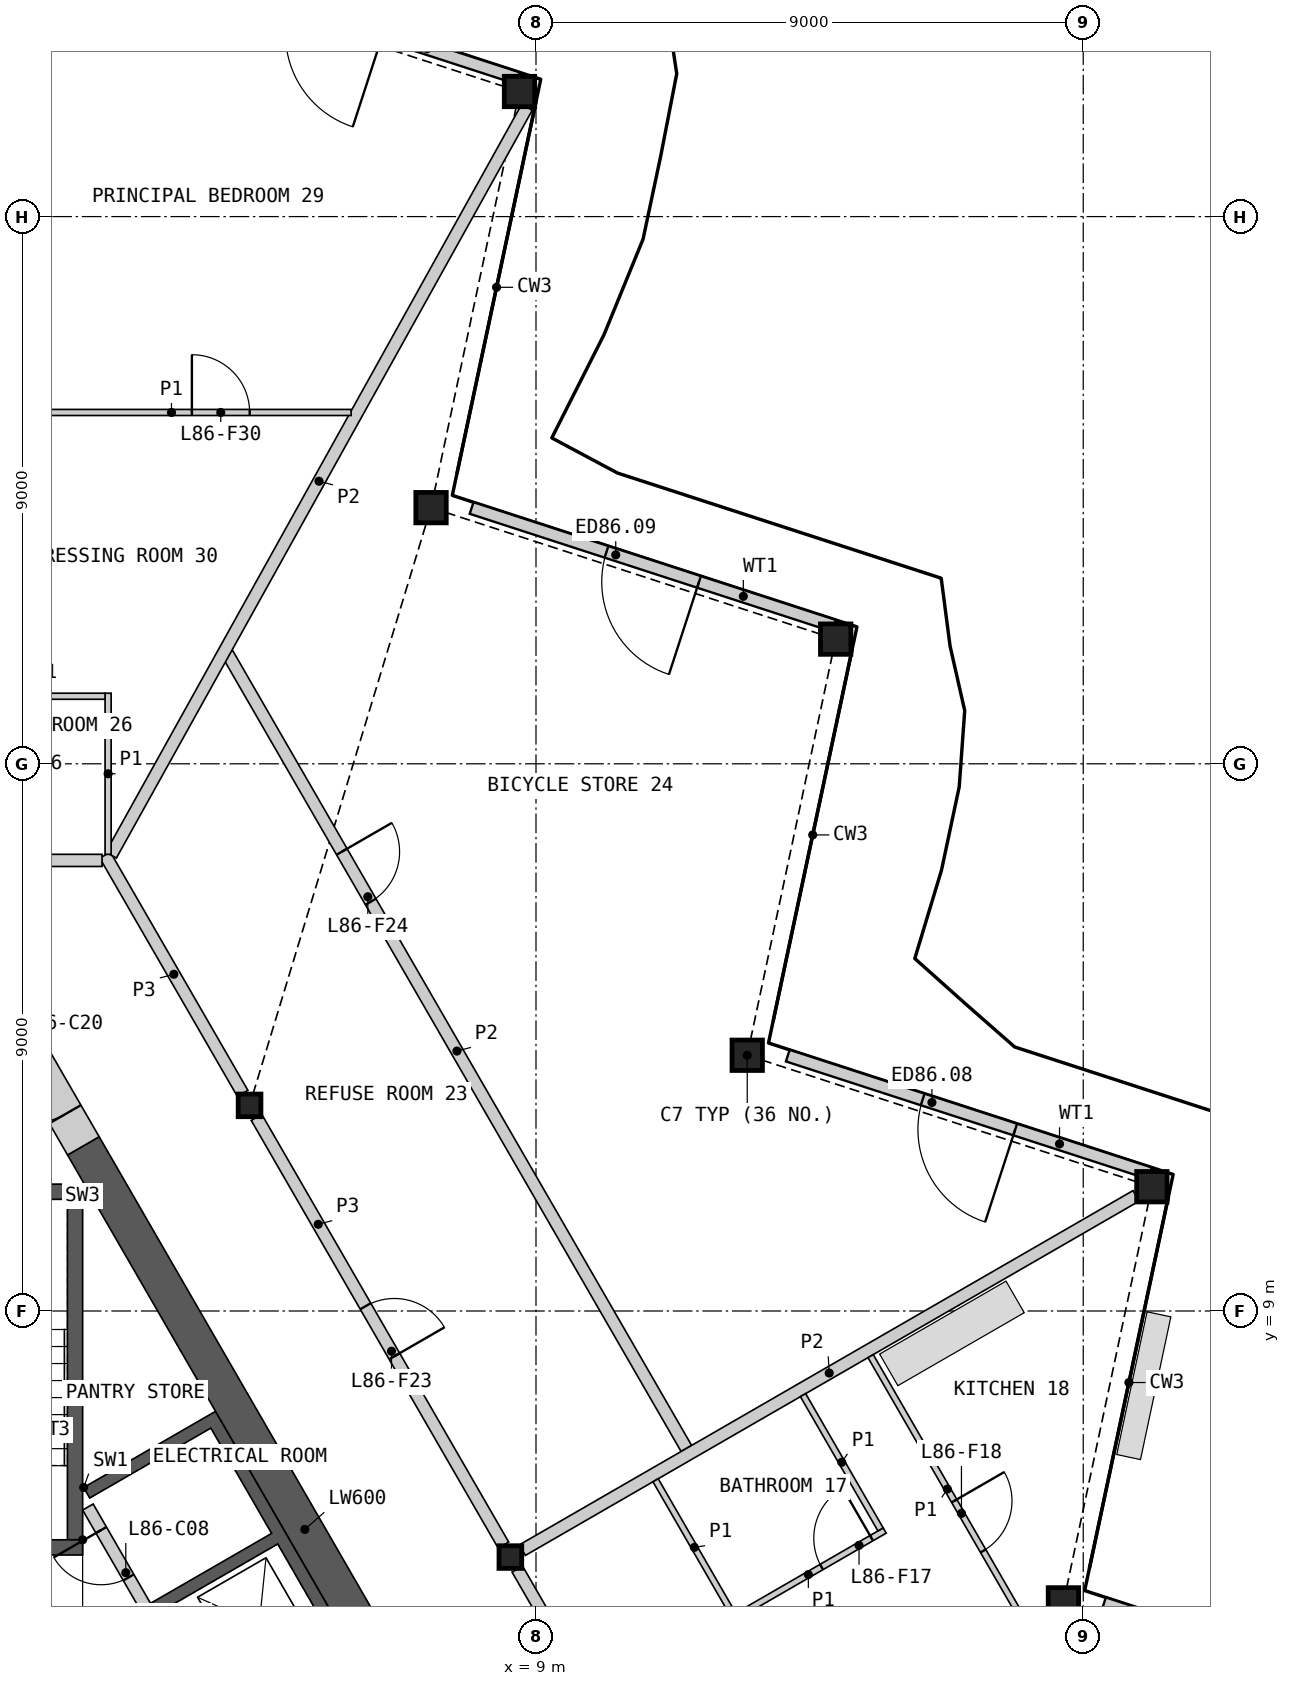
"""IFC4 building model, lengths in metres.
Left out: names, types, materials, properties, quantities, classifications, styles, units other than length and angle.
Written with IfcOpenShell. Run it as: python <this file> out.ifc"""

import sys

from ifc_helpers import new_model, si_unit, direction, frame, frame_2d, origin, origin_2d, place, context, subcontext, project, spatial, polyline, rectangle, hollow_rectangle, i_section, outline, extrude, element, fill, save


model = new_model("IFC4")
c1 = context("Model", 3, precision=1e-05, world=origin(), true_north=direction((0.0, 1.0)))
c2 = subcontext(c1, "Body", "Model", "MODEL_VIEW")
j1 = project(units=[si_unit("LENGTHUNIT", "METRE"), si_unit("PLANEANGLEUNIT", "RADIAN")], contexts=[c1])
p1 = place(None, origin())
s1 = spatial("IfcSite", under=j1, at=p1, CompositionType="ELEMENT")
p2 = place(p1, origin())
s2 = spatial("IfcBuilding", under=s1, at=p2, CompositionType="ELEMENT")
p3 = place(p2, frame((0.0, 0.0, 381.4)))
s3 = spatial("IfcBuildingStorey", under=s2, at=p3, CompositionType="ELEMENT", Elevation=381.4)
for number, where, z_axis, x_axis in (
    (1, (17.674, 4.199, 0.0), (0.0, 0.0, 1.0), (1.0, 0.0, 0.0)),
    (2, (19.129, 11.044, 0.0), (0.0, 0.0, 1.0), (1.0, 0.0, 0.0)),
    (3, (12.474, 13.206, 0.0), (0.0, 0.0, 1.0), (1.0, 0.0, 0.0)),
    (4, (13.929, 20.051, 0.0), (0.0, 0.0, 1.0), (1.0, 0.0, 0.0)),
    (5, (7.274, 22.213, 0.0), (0.0, 0.0, 1.0), (1.0, 0.0, 0.0)),
    (6, (8.729, 29.057, 0.0), (0.0, 0.0, 1.0), (1.0, 0.0, 0.0)),
):
    element("IfcColumn", number, at=place(p3, frame(where, z_axis=z_axis, x_axis=x_axis)), inside=s3, PredefinedType="COLUMN", context=c2, shape_type="SweptSolid", body=[
        extrude(hollow_rectangle(XDim=0.5, YDim=0.5, WallThickness=0.03, at=origin_2d()), origin(), (0.0, 0.0, 1.0), 3.4),
    ])
for number, where, z_axis, x_axis in (
    (7, (8.578, 4.953, 0.0), (0.0, 0.0, 1.0), (1.0, 0.0, 0.0)),
    (8, (4.289, 12.382, 0.0), (0.0, 0.0, 1.0), (1.0, 0.0, 0.0)),
):
    element("IfcColumn", number, at=place(p3, frame(where, z_axis=z_axis, x_axis=x_axis)), inside=s3, PredefinedType="COLUMN", context=c2, shape_type="SweptSolid", body=[
        extrude(i_section(OverallWidth=0.374, OverallDepth=0.372, WebThickness=0.016, FlangeThickness=0.026, at=origin_2d()), origin(), (0.0, 0.0, 1.0), 3.4),
    ])
p4 = place(p3, frame((24.3, 2.257, 0.0), z_axis=(0.0, 0.0, 1.0), x_axis=(-0.951060123915, 0.309005891041, 0.0)))
e9 = element("IfcWall", 9, at=p4, inside=s3, PredefinedType="SOLIDWALL", context=c2, shape_type="SweptSolid", body=[
    extrude(rectangle(XDim=6.265, YDim=0.2, at=frame_2d((3.133, 0.0))), origin(), (0.0, 0.0, 1.0), 2.634),
])
p5 = place(p4, frame((2.333, 0.0, 0.0)))
e10 = element("IfcOpeningElement", 10, at=p5, cuts=e9, PredefinedType="OPENING", context=c2, shape_type="SweptSolid", body=[
    extrude(rectangle(XDim=1.6, YDim=2.25, at=frame_2d((0.8, 1.125))), frame((0.0, 0.11, 0.0), z_axis=(0.0, -1.0, 0.0), x_axis=(1.0, 0.0, 0.0)), (0.0, 0.0, 1.0), 0.22),
])
p6 = place(p3, frame((19.099, 11.264, 0.0), z_axis=(0.0, 0.0, 1.0), x_axis=(-0.951056402988, 0.3090173431, 0.0)))
e11 = element("IfcWall", 11, at=p6, inside=s3, PredefinedType="SOLIDWALL", context=c2, shape_type="SweptSolid", body=[
    extrude(rectangle(XDim=6.265, YDim=0.2, at=frame_2d((3.133, 0.0))), origin(), (0.0, 0.0, 1.0), 2.634),
])
p7 = place(p6, frame((2.333, 0.0, 0.0)))
e12 = element("IfcOpeningElement", 12, at=p7, cuts=e11, PredefinedType="OPENING", context=c2, shape_type="SweptSolid", body=[
    extrude(rectangle(XDim=1.6, YDim=2.25, at=frame_2d((0.8, 1.125))), frame((0.0, 0.11, 0.0), z_axis=(0.0, -1.0, 0.0), x_axis=(1.0, 0.0, 0.0)), (0.0, 0.0, 1.0), 0.22),
])
p8 = place(p3, frame((13.899, 20.271, 0.0), z_axis=(0.0, 0.0, 1.0), x_axis=(-0.951056402988, 0.3090173431, 0.0)))
e13 = element("IfcWall", 13, at=p8, inside=s3, PredefinedType="SOLIDWALL", context=c2, shape_type="SweptSolid", body=[
    extrude(rectangle(XDim=6.265, YDim=0.2, at=frame_2d((3.133, 0.0))), origin(), (0.0, 0.0, 1.0), 2.634),
])
p9 = place(p8, frame((2.333, 0.0, 0.0)))
e14 = element("IfcOpeningElement", 14, at=p9, cuts=e13, PredefinedType="OPENING", context=c2, shape_type="SweptSolid", body=[
    extrude(rectangle(XDim=1.6, YDim=2.25, at=frame_2d((0.8, 1.125))), frame((0.0, 0.11, 0.0), z_axis=(0.0, -1.0, 0.0), x_axis=(1.0, 0.0, 0.0)), (0.0, 0.0, 1.0), 0.22),
])
p10 = place(p3, frame((8.699, 29.277, 0.0), z_axis=(0.0, 0.0, 1.0), x_axis=(-0.951048671744, 0.309041136379, 0.0)))
e15 = element("IfcWall", 15, at=p10, inside=s3, PredefinedType="SOLIDWALL", context=c2, shape_type="SweptSolid", body=[
    extrude(rectangle(XDim=6.265, YDim=0.2, at=frame_2d((3.133, 0.0))), origin(), (0.0, 0.0, 1.0), 2.634),
])
p11 = place(p10, frame((2.333, 0.0, 0.0)))
e16 = element("IfcOpeningElement", 16, at=p11, cuts=e15, PredefinedType="OPENING", context=c2, shape_type="SweptSolid", body=[
    extrude(rectangle(XDim=1.6, YDim=2.25, at=frame_2d((0.8, 1.125))), frame((0.0, 0.11, 0.0), z_axis=(0.0, -1.0, 0.0), x_axis=(1.0, 0.0, 0.0)), (0.0, 0.0, 1.0), 0.22),
])
p12 = place(p3, origin())
e17 = element("IfcWall", 17, at=p12, inside=s3, PredefinedType="SHEAR", context=c2, shape_type="SweptSolid", body=[
    extrude(outline(polyline([(1.561, 6.097), (3.731, 7.35), (8.231, -0.444), (6.061, -1.697), (5.96, -1.524), (7.952, -0.374), (6.952, 1.358), (4.96, 0.208), (4.861, 0.381), (6.852, 1.531), (5.852, 3.263), (3.861, 2.113), (3.76, 2.287), (5.752, 3.437), (4.752, 5.169), (2.76, 4.019), (2.66, 4.192), (4.652, 5.342), (3.652, 7.074), (1.66, 5.924), (1.561, 6.097)])), origin(), (0.0, 0.0, 1.0), 3.1),
])
p13 = place(p3, frame((5.817, -1.476, 0.0), z_axis=(0.0, 0.0, 1.0), x_axis=(-0.500002616675, 0.866023893041, 0.0)))
e18 = element("IfcWall", 18, at=p13, inside=s3, PredefinedType="SOLIDWALL", context=c2, shape_type="SweptSolid", body=[
    extrude(rectangle(XDim=8.373, YDim=0.2, at=frame_2d((4.187, 0.0))), origin(), (0.0, 0.0, 1.0), 3.1),
])
p14 = place(p13, frame((0.337, 0.0, 0.0)))
e19 = element("IfcOpeningElement", 19, at=p14, cuts=e18, PredefinedType="OPENING", context=c2, shape_type="SweptSolid", body=[
    extrude(rectangle(XDim=1.1, YDim=2.1, at=frame_2d((0.55, 1.05))), frame((0.0, 0.11, 0.0), z_axis=(0.0, -1.0, 0.0), x_axis=(1.0, 0.0, 0.0)), (0.0, 0.0, 1.0), 0.22),
])
p15 = place(p13, frame((2.537, 0.0, 0.0)))
e20 = element("IfcOpeningElement", 20, at=p15, cuts=e18, PredefinedType="OPENING", context=c2, shape_type="SweptSolid", body=[
    extrude(rectangle(XDim=1.1, YDim=2.1, at=frame_2d((0.55, 1.05))), frame((0.0, 0.11, 0.0), z_axis=(0.0, -1.0, 0.0), x_axis=(1.0, 0.0, 0.0)), (0.0, 0.0, 1.0), 0.22),
])
p16 = place(p13, frame((4.737, 0.0, 0.0)))
e21 = element("IfcOpeningElement", 21, at=p16, cuts=e18, PredefinedType="OPENING", context=c2, shape_type="SweptSolid", body=[
    extrude(rectangle(XDim=1.1, YDim=2.1, at=frame_2d((0.55, 1.05))), frame((0.0, 0.11, 0.0), z_axis=(0.0, -1.0, 0.0), x_axis=(1.0, 0.0, 0.0)), (0.0, 0.0, 1.0), 0.22),
])
p17 = place(p13, frame((7.037, 0.0, 0.0)))
e22 = element("IfcOpeningElement", 22, at=p17, cuts=e18, PredefinedType="OPENING", context=c2, shape_type="SweptSolid", body=[
    extrude(rectangle(XDim=0.9, YDim=2.1, at=frame_2d((0.45, 1.05))), frame((0.0, 0.11, 0.0), z_axis=(0.0, -1.0, 0.0), x_axis=(1.0, 0.0, 0.0)), (0.0, 0.0, 1.0), 0.22),
])
p18 = place(p3, origin())
e23 = element("IfcWall", 23, at=p18, inside=s3, PredefinedType="SHEAR", context=c2, shape_type="SweptSolid", body=[
    extrude(outline(polyline([(1.544, 5.237), (1.544, 11.087), (1.294, 10.837), (1.294, 5.237), (1.544, 5.237)])), origin(), (0.0, 0.0, 1.0), 3.1),
])
p19 = place(p3, origin())
e24 = element("IfcWall", 24, at=p19, inside=s3, PredefinedType="SHEAR", context=c2, shape_type="SweptSolid", body=[
    extrude(outline(polyline([(1.544, 11.087), (-1.544, 11.087), (-1.294, 10.837), (1.294, 10.837), (1.544, 11.087)])), origin(), (0.0, 0.0, 1.0), 3.1),
])
p20 = place(p3, frame((1.544, 5.112, 0.0), z_axis=(0.0, 0.0, 1.0), x_axis=(-1.0, 0.0, 0.0)))
e25 = element("IfcWall", 25, at=p20, inside=s3, PredefinedType="SHEAR", context=c2, shape_type="SweptSolid", body=[
    extrude(rectangle(XDim=3.088, YDim=0.25, at=frame_2d((1.544, 0.0))), origin(), (0.0, 0.0, 1.0), 3.1),
])
p21 = place(p20, frame((0.994, 0.0, 0.0)))
e26 = element("IfcOpeningElement", 26, at=p21, cuts=e25, PredefinedType="OPENING", context=c2, shape_type="SweptSolid", body=[
    extrude(rectangle(XDim=1.1, YDim=2.1, at=frame_2d((0.55, 1.05))), frame((0.0, 0.135, 0.0), z_axis=(0.0, -1.0, 0.0), x_axis=(1.0, 0.0, 0.0)), (0.0, 0.0, 1.0), 0.27),
])
p22 = place(p3, frame((8.841, -0.902, 0.0), z_axis=(0.0, 0.0, 1.0), x_axis=(-0.499995618375, 0.866027933502, 0.0)))
e27 = element("IfcWall", 27, at=p22, inside=s3, PredefinedType="SHEAR", context=c2, shape_type="SweptSolid", body=[
    extrude(rectangle(XDim=14.571, YDim=0.6, at=frame_2d((7.285, 0.0))), origin(), (0.0, 0.0, 1.0), 3.1),
])
p23 = place(p3, frame((1.556, 11.716, 0.0), z_axis=(0.0, 0.0, 1.0), x_axis=(-0.500018667571, 0.866014625789, 0.0)))
e28 = element("IfcWall", 28, at=p23, inside=s3, PredefinedType="SHEAR", context=c2, shape_type="SweptSolid", body=[
    extrude(rectangle(XDim=2.592, YDim=0.6, at=frame_2d((1.296, 0.0))), origin(), (0.0, 0.0, 1.0), 3.1),
])
p24 = place(p23, frame((0.6, 0.0, 0.0)))
e29 = element("IfcOpeningElement", 29, at=p24, cuts=e28, PredefinedType="OPENING", context=c2, shape_type="SweptSolid", body=[
    extrude(rectangle(XDim=1.0, YDim=2.1, at=frame_2d((0.5, 1.05))), frame((0.0, 0.31, 0.0), z_axis=(0.0, -1.0, 0.0), x_axis=(1.0, 0.0, 0.0)), (0.0, 0.0, 1.0), 0.62),
])
p25 = place(p3, frame((4.403, 12.185, 0.0), z_axis=(0.0, 0.0, 1.0), x_axis=(0.499992155518, -0.866029932751, 0.0)))
e30 = element("IfcWall", 30, at=p25, inside=s3, PredefinedType="PARTITIONING", context=c2, shape_type="SweptSolid", body=[
    extrude(rectangle(XDim=8.123, YDim=0.2, at=frame_2d((4.062, 0.0))), origin(), (0.0, 0.0, 1.0), 3.1),
])
p26 = place(p25, frame((3.587, 0.0, 0.0)))
e31 = element("IfcOpeningElement", 31, at=p26, cuts=e30, PredefinedType="OPENING", context=c2, shape_type="SweptSolid", body=[
    extrude(rectangle(XDim=0.95, YDim=2.1, at=frame_2d((0.475, 1.05))), frame((0.0, 0.11, 0.0), z_axis=(0.0, -1.0, 0.0), x_axis=(1.0, 0.0, 0.0)), (0.0, 0.0, 1.0), 0.22),
])
p27 = place(p3, frame((8.692, 4.756, 0.0), z_axis=(0.0, 0.0, 1.0), x_axis=(0.500001682468, -0.866024432409, 0.0)))
e32 = element("IfcWall", 32, at=p27, inside=s3, PredefinedType="PARTITIONING", context=c2, shape_type="SweptSolid", body=[
    extrude(rectangle(XDim=8.124, YDim=0.2, at=frame_2d((4.062, 0.0))), origin(), (0.0, 0.0, 1.0), 3.1),
])
p28 = place(p27, frame((1.956, 0.0, 0.0)))
e33 = element("IfcOpeningElement", 33, at=p28, cuts=e32, PredefinedType="OPENING", context=c2, shape_type="SweptSolid", body=[
    extrude(rectangle(XDim=1.0, YDim=2.1, at=frame_2d((0.5, 1.05))), frame((0.0, 0.11, 0.0), z_axis=(0.0, -1.0, 0.0), x_axis=(1.0, 0.0, 0.0)), (0.0, 0.0, 1.0), 0.22),
])
p29 = place(p3, frame((1.913, 16.498, 0.0), z_axis=(0.0, 0.0, 1.0), x_axis=(0.499974648164, -0.866040040179, 0.0)))
e34 = element("IfcWall", 34, at=p29, inside=s3, PredefinedType="PARTITIONING", context=c2, shape_type="SweptSolid", body=[
    extrude(rectangle(XDim=4.525, YDim=0.2, at=frame_2d((2.263, 0.0))), origin(), (0.0, 0.0, 1.0), 3.1),
])
p30 = place(p3, frame((-1.838, 16.411, 0.0), z_axis=(0.0, 0.0, 1.0), x_axis=(1.0, 0.0, 0.0)))
e35 = element("IfcWall", 35, at=p30, inside=s3, PredefinedType="PARTITIONING", context=c2, shape_type="SweptSolid", body=[
    extrude(rectangle(XDim=3.701, YDim=0.2, at=frame_2d((1.851, 0.0))), origin(), (0.0, 0.0, 1.0), 3.1),
])
p31 = place(p30, frame((0.25, 0.0, 0.0)))
e36 = element("IfcOpeningElement", 36, at=p31, cuts=e35, PredefinedType="OPENING", context=c2, shape_type="SweptSolid", body=[
    extrude(rectangle(XDim=1.0, YDim=2.1, at=frame_2d((0.5, 1.05))), frame((0.0, 0.11, 0.0), z_axis=(0.0, -1.0, 0.0), x_axis=(1.0, 0.0, 0.0)), (0.0, 0.0, 1.0), 0.22),
])
p32 = place(p3, frame((3.926, 19.811, 0.0), z_axis=(0.0, 0.0, 1.0), x_axis=(0.500001082559, -0.866024778768, 0.0)))
e37 = element("IfcWall", 37, at=p32, inside=s3, PredefinedType="PARTITIONING", context=c2, shape_type="SweptSolid", body=[
    extrude(rectangle(XDim=15.094, YDim=0.2, at=frame_2d((7.547, 0.0))), origin(), (0.0, 0.0, 1.0), 2.33),
])
p33 = place(p32, frame((3.761, 0.0, 0.0)))
e38 = element("IfcOpeningElement", 38, at=p33, cuts=e37, PredefinedType="OPENING", context=c2, shape_type="SweptSolid", body=[
    extrude(rectangle(XDim=0.95, YDim=2.1, at=frame_2d((0.475, 1.05))), frame((0.0, 0.11, 0.0), z_axis=(0.0, -1.0, 0.0), x_axis=(1.0, 0.0, 0.0)), (0.0, 0.0, 1.0), 0.22),
])
p34 = place(p3, frame((2.012, 16.498, 0.0), z_axis=(0.0, 0.0, 1.0), x_axis=(0.485991996179, 0.873963259897, 0.0)))
e39 = element("IfcWall", 39, at=p34, inside=s3, PredefinedType="PARTITIONING", context=c2, shape_type="SweptSolid", body=[
    extrude(rectangle(XDim=14.073, YDim=0.2, at=frame_2d((7.036, 0.0))), origin(), (0.0, 0.0, 1.0), 2.33),
])
p35 = place(p3, frame((8.775, 5.066, 0.0), z_axis=(0.0, 0.0, 1.0), x_axis=(0.866023724155, 0.500002909193, 0.0)))
e40 = element("IfcWall", 40, at=p35, inside=s3, PredefinedType="PARTITIONING", context=c2, shape_type="SweptSolid", body=[
    extrude(rectangle(XDim=11.655, YDim=0.2, at=frame_2d((5.827, 0.0))), origin(), (0.0, 0.0, 1.0), 2.33),
])
p36 = place(p3, frame((0.05, 23.778, 0.0), z_axis=(0.0, 0.0, 1.0), x_axis=(1.0, 0.0, 0.0)))
e41 = element("IfcWall", 41, at=p36, inside=s3, PredefinedType="PARTITIONING", context=c2, shape_type="SweptSolid", body=[
    extrude(rectangle(XDim=5.91, YDim=0.1, at=frame_2d((2.955, 0.0))), origin(), (0.0, 0.0, 1.0), 2.33),
])
p37 = place(p36, frame((3.291, 0.0, 0.0)))
e42 = element("IfcOpeningElement", 42, at=p37, cuts=e41, PredefinedType="OPENING", context=c2, shape_type="SweptSolid", body=[
    extrude(rectangle(XDim=0.95, YDim=2.1, at=frame_2d((0.475, 1.05))), frame((0.0, 0.06, 0.0), z_axis=(0.0, -1.0, 0.0), x_axis=(1.0, 0.0, 0.0)), (0.0, 0.0, 1.0), 0.12),
])
p38 = place(p3, frame((14.503, 8.258, 0.0), z_axis=(0.0, 0.0, 1.0), x_axis=(0.500012591307, -0.866018134068, 0.0)))
e43 = element("IfcWall", 43, at=p38, inside=s3, PredefinedType="PARTITIONING", context=c2, shape_type="SweptSolid", body=[
    extrude(rectangle(XDim=5.05, YDim=0.1, at=frame_2d((2.525, 0.0))), origin(), (0.0, 0.0, 1.0), 2.33),
])
p39 = place(p38, frame((2.75, 0.0, 0.0)))
e44 = element("IfcOpeningElement", 44, at=p39, cuts=e43, PredefinedType="OPENING", context=c2, shape_type="SweptSolid", body=[
    extrude(rectangle(XDim=0.95, YDim=2.1, at=frame_2d((0.475, 1.05))), frame((0.0, 0.06, 0.0), z_axis=(0.0, -1.0, 0.0), x_axis=(1.0, 0.0, 0.0)), (0.0, 0.0, 1.0), 0.12),
])
p40 = place(p3, frame((12.223, 3.939, 0.0), z_axis=(0.0, 0.0, 1.0), x_axis=(0.866032775405, 0.499987231761, 0.0)))
e45 = element("IfcWall", 45, at=p40, inside=s3, PredefinedType="PARTITIONING", context=c2, shape_type="SweptSolid", body=[
    extrude(rectangle(XDim=2.9, YDim=0.1, at=frame_2d((1.45, 0.0))), origin(), (0.0, 0.0, 1.0), 2.33),
])
p41 = place(p40, frame((1.7, 0.0, 0.0)))
e46 = element("IfcOpeningElement", 46, at=p41, cuts=e45, PredefinedType="OPENING", context=c2, shape_type="SweptSolid", body=[
    extrude(rectangle(XDim=0.95, YDim=2.1, at=frame_2d((0.475, 1.05))), frame((0.0, 0.06, 0.0), z_axis=(0.0, -1.0, 0.0), x_axis=(1.0, 0.0, 0.0)), (0.0, 0.0, 1.0), 0.12),
])
for number, where, z_axis, x_axis in (
    (47, (10.967, 6.216, 0.0), (0.0, 0.0, 1.0), (0.5, -0.866, 0.0)),
    (48, (13.392, 7.616, 0.0), (0.0, 0.0, 1.0), (0.5, -0.866, 0.0)),
):
    element("IfcWall", number, at=place(p3, frame(where, z_axis=z_axis, x_axis=x_axis)), inside=s3, PredefinedType="PARTITIONING", context=c2, shape_type="SweptSolid", body=[
        extrude(rectangle(XDim=2.55, YDim=0.1, at=frame_2d((1.275, 0.0))), origin(), (0.0, 0.0, 1.0), 2.33),
    ])
p42 = place(p3, frame((1.963, 16.511, 0.0), z_axis=(0.0, 0.0, 1.0), x_axis=(0.0, 1.0, 0.0)))
e49 = element("IfcWall", 49, at=p42, inside=s3, PredefinedType="PARTITIONING", context=c2, shape_type="SweptSolid", body=[
    extrude(rectangle(XDim=2.65, YDim=0.1, at=frame_2d((1.325, 0.0))), origin(), (0.0, 0.0, 1.0), 2.33),
])
p43 = place(p3, frame((-0.06, 19.111, 0.0), z_axis=(0.0, 0.0, 1.0), x_axis=(1.0, 0.0, 0.0)))
e50 = element("IfcWall", 50, at=p43, inside=s3, PredefinedType="PARTITIONING", context=c2, shape_type="SweptSolid", body=[
    extrude(rectangle(XDim=1.973, YDim=0.1, at=frame_2d((0.987, 0.0))), origin(), (0.0, 0.0, 1.0), 2.33),
])
p44 = place(p7, origin())
e51 = element("IfcDoor", 51, at=p44, inside=s3, OperationType="DOUBLE_DOOR_SINGLE_SWING", PredefinedType="DOOR", context=c2, shape_type="SweptSolid", body=[
    extrude(rectangle(XDim=1.6, YDim=2.25, at=frame_2d((0.8, 1.125))), frame((0.0, 0.025, 0.0), z_axis=(0.0, -1.0, 0.0), x_axis=(1.0, 0.0, 0.0)), (0.0, 0.0, 1.0), 0.05),
])
fill(e12, e51)
p45 = place(p9, origin())
e52 = element("IfcDoor", 52, at=p45, inside=s3, OperationType="DOUBLE_DOOR_SINGLE_SWING", PredefinedType="DOOR", context=c2, shape_type="SweptSolid", body=[
    extrude(rectangle(XDim=1.6, YDim=2.25, at=frame_2d((0.8, 1.125))), frame((0.0, 0.025, 0.0), z_axis=(0.0, -1.0, 0.0), x_axis=(1.0, 0.0, 0.0)), (0.0, 0.0, 1.0), 0.05),
])
fill(e14, e52)
p46 = place(p17, origin())
e53 = element("IfcDoor", 53, at=p46, inside=s3, OperationType="SINGLE_SWING_RIGHT", PredefinedType="DOOR", context=c2, shape_type="SweptSolid", body=[
    extrude(rectangle(XDim=0.9, YDim=2.1, at=frame_2d((0.45, 1.05))), frame((0.0, 0.025, 0.0), z_axis=(0.0, -1.0, 0.0), x_axis=(1.0, 0.0, 0.0)), (0.0, 0.0, 1.0), 0.05),
])
fill(e22, e53)
p47 = place(p24, origin())
e54 = element("IfcDoor", 54, at=p47, inside=s3, OperationType="SINGLE_SWING_RIGHT", PredefinedType="DOOR", context=c2, shape_type="SweptSolid", body=[
    extrude(rectangle(XDim=1.0, YDim=2.1, at=frame_2d((0.5, 1.05))), frame((0.0, 0.055, 0.0), z_axis=(0.0, -1.0, 0.0), x_axis=(1.0, 0.0, 0.0)), (0.0, 0.0, 1.0), 0.05),
])
fill(e29, e54)
p48 = place(p41, origin())
e55 = element("IfcDoor", 55, at=p48, inside=s3, OperationType="SINGLE_SWING_RIGHT", PredefinedType="DOOR", context=c2, shape_type="SweptSolid", body=[
    extrude(rectangle(XDim=0.95, YDim=2.1, at=frame_2d((0.475, 1.05))), frame((0.0, 0.025, 0.0), z_axis=(0.0, -1.0, 0.0), x_axis=(1.0, 0.0, 0.0)), (0.0, 0.0, 1.0), 0.05),
])
fill(e46, e55)
p49 = place(p39, origin())
e56 = element("IfcDoor", 56, at=p49, inside=s3, OperationType="SINGLE_SWING_LEFT", PredefinedType="DOOR", context=c2, shape_type="SweptSolid", body=[
    extrude(rectangle(XDim=0.95, YDim=2.1, at=frame_2d((0.475, 1.05))), frame((0.0, 0.025, 0.0), z_axis=(0.0, -1.0, 0.0), x_axis=(1.0, 0.0, 0.0)), (0.0, 0.0, 1.0), 0.05),
])
fill(e44, e56)
p50 = place(p26, origin())
e57 = element("IfcDoor", 57, at=p50, inside=s3, OperationType="SINGLE_SWING_RIGHT", PredefinedType="DOOR", context=c2, shape_type="SweptSolid", body=[
    extrude(rectangle(XDim=0.95, YDim=2.1, at=frame_2d((0.475, 1.05))), frame((0.0, 0.025, 0.0), z_axis=(0.0, -1.0, 0.0), x_axis=(1.0, 0.0, 0.0)), (0.0, 0.0, 1.0), 0.05),
])
fill(e31, e57)
p51 = place(p33, origin())
e58 = element("IfcDoor", 58, at=p51, inside=s3, OperationType="SINGLE_SWING_LEFT", PredefinedType="DOOR", context=c2, shape_type="SweptSolid", body=[
    extrude(rectangle(XDim=0.95, YDim=2.1, at=frame_2d((0.475, 1.05))), frame((0.0, 0.025, 0.0), z_axis=(0.0, -1.0, 0.0), x_axis=(1.0, 0.0, 0.0)), (0.0, 0.0, 1.0), 0.05),
])
fill(e38, e58)
p52 = place(p37, origin())
e59 = element("IfcDoor", 59, at=p52, inside=s3, OperationType="SINGLE_SWING_LEFT", PredefinedType="DOOR", context=c2, shape_type="SweptSolid", body=[
    extrude(rectangle(XDim=0.95, YDim=2.1, at=frame_2d((0.475, 1.05))), frame((0.0, 0.025, 0.0), z_axis=(0.0, -1.0, 0.0), x_axis=(1.0, 0.0, 0.0)), (0.0, 0.0, 1.0), 0.05),
])
fill(e42, e59)
save(model, sys.argv[1])
